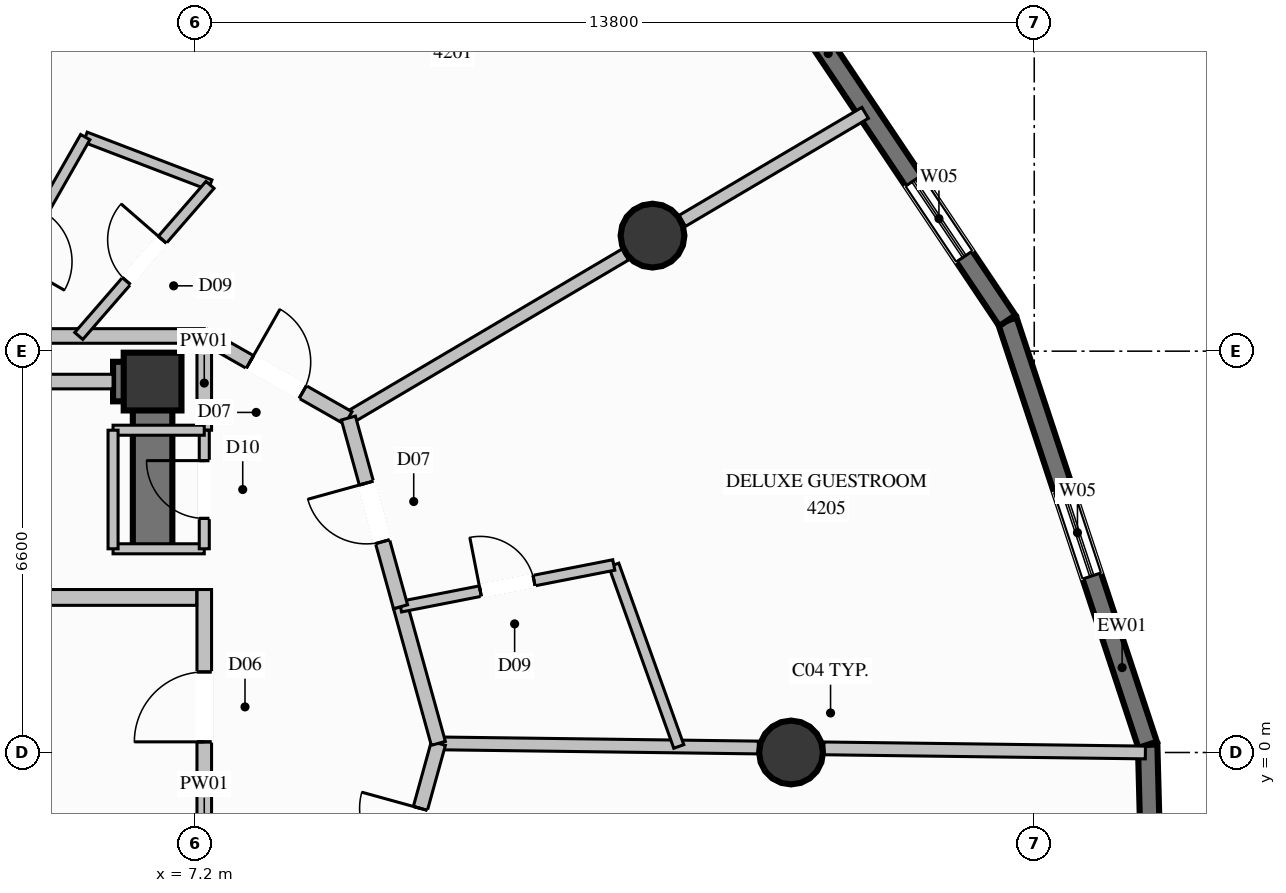
"""IFC4 building model, lengths in metres.
Left out: names, types, materials, properties, quantities, classifications, styles, units other than length and angle.
Written with IfcOpenShell. Run it as: python <this file> out.ifc"""

import sys

from ifc_helpers import new_model, si_unit, direction, frame, frame_2d, origin, origin_2d, place, context, subcontext, project, spatial, rectangle, circle, extrude, element, fill, save


model = new_model("IFC4")
c1 = context("Model", 3, precision=1e-05, world=origin(), true_north=direction((0.0, 1.0)))
c2 = subcontext(c1, "Body", "Model", "MODEL_VIEW")
j1 = project(units=[si_unit("LENGTHUNIT", "METRE"), si_unit("PLANEANGLEUNIT", "RADIAN")], contexts=[c1])
p1 = place(None, origin())
s1 = spatial("IfcSite", under=j1, at=p1, CompositionType="ELEMENT")
p2 = place(p1, origin())
s2 = spatial("IfcBuilding", under=s1, at=p2, CompositionType="ELEMENT")
p3 = place(p2, frame((0.0, 0.0, 156.6)))
s3 = spatial("IfcBuildingStorey", under=s2, at=p3, CompositionType="ELEMENT", Elevation=156.6)
p4 = place(p3, frame((6.5, 6.1, 0.0), z_axis=(0.0, 0.0, 1.0), x_axis=(1.0, 0.0, 0.0)))
e1 = element("IfcColumn", 1, at=p4, inside=s3, PredefinedType="COLUMN", context=c2, shape_type="SweptSolid", body=[
    extrude(rectangle(XDim=0.95, YDim=0.95, at=origin_2d()), origin(), (0.0, 0.0, 1.0), 3.6),
])
p5 = place(p3, frame((5.85, 6.1, 0.0), z_axis=(0.0, 0.0, 1.0), x_axis=(1.0, 0.0, 0.0)))
e2 = element("IfcWall", 2, at=p5, inside=s3, PredefinedType="SHEAR", context=c2, shape_type="SweptSolid", body=[
    extrude(rectangle(XDim=0.325, YDim=0.65, at=frame_2d((0.163, 0.0))), origin(), (0.0, 0.0, 1.0), 3.6),
])
p6 = place(p3, frame((6.5, 3.35, 0.0), z_axis=(0.0, 0.0, 1.0), x_axis=(0.0, 1.0, 0.0)))
e3 = element("IfcWall", 3, at=p6, inside=s3, PredefinedType="SHEAR", context=c2, shape_type="SweptSolid", body=[
    extrude(rectangle(XDim=3.075, YDim=0.65, at=frame_2d((1.538, 0.0))), origin(), (0.0, 0.0, 1.0), 3.6),
])
for number, where, z_axis, x_axis in (
    (4, (17.0, 0.0, 0.0), (0.0, 0.0, 1.0), (1.0, 0.0, 0.0)),
    (5, (14.722, 8.5, 0.0), (0.0, 0.0, 1.0), (1.0, 0.0, 0.0)),
):
    element("IfcColumn", number, at=place(p3, frame(where, z_axis=z_axis, x_axis=x_axis)), inside=s3, PredefinedType="COLUMN", context=c2, shape_type="SweptSolid", body=[
        extrude(circle(Radius=0.525, at=origin_2d()), origin(), (0.0, 0.0, 1.0), 3.6),
    ])
p7 = place(p3, frame((22.865, 0.127, 0.0), z_axis=(0.0, 0.0, 1.0), x_axis=(0.026197372112, -0.999656789951, 0.0)))
e6 = element("IfcWall", 6, at=p7, inside=s3, PredefinedType="SOLIDWALL", context=c2, shape_type="SweptSolid", body=[
    extrude(rectangle(XDim=6.99, YDim=0.32, at=frame_2d((3.495, 0.0))), origin(), (0.0, 0.0, 1.0), 3.35),
])
p8 = place(p7, frame((2.458, 0.0, 0.85)))
e7 = element("IfcOpeningElement", 7, at=p8, cuts=e6, PredefinedType="OPENING", context=c2, shape_type="SweptSolid", body=[
    extrude(rectangle(XDim=1.5, YDim=1.2, at=frame_2d((0.75, 0.6))), frame((0.0, 0.17, 0.0), z_axis=(0.0, -1.0, 0.0), x_axis=(1.0, 0.0, 0.0)), (0.0, 0.0, 1.0), 0.34),
])
p9 = place(p3, frame((20.557, 7.102, 0.0), z_axis=(0.0, 0.0, 1.0), x_axis=(0.314153478082, -0.94937220952, 0.0)))
e8 = element("IfcWall", 8, at=p9, inside=s3, PredefinedType="SOLIDWALL", context=c2, shape_type="SweptSolid", body=[
    extrude(rectangle(XDim=7.347, YDim=0.32, at=frame_2d((3.674, 0.0))), origin(), (0.0, 0.0, 1.0), 3.35),
])
p10 = place(p9, frame((2.923, 0.0, 0.85)))
e9 = element("IfcOpeningElement", 9, at=p10, cuts=e8, PredefinedType="OPENING", context=c2, shape_type="SweptSolid", body=[
    extrude(rectangle(XDim=1.5, YDim=1.2, at=frame_2d((0.75, 0.6))), frame((0.0, 0.17, 0.0), z_axis=(0.0, -1.0, 0.0), x_axis=(1.0, 0.0, 0.0)), (0.0, 0.0, 1.0), 0.34),
])
p11 = place(p3, frame((16.349, 13.381, 0.0), z_axis=(0.0, 0.0, 1.0), x_axis=(0.556688780243, -0.830721133685, 0.0)))
e10 = element("IfcWall", 10, at=p11, inside=s3, PredefinedType="SOLIDWALL", context=c2, shape_type="SweptSolid", body=[
    extrude(rectangle(XDim=7.559, YDim=0.32, at=frame_2d((3.779, 0.0))), origin(), (0.0, 0.0, 1.0), 3.35),
])
p12 = place(p11, frame((4.789, 0.0, 0.85)))
e11 = element("IfcOpeningElement", 11, at=p12, cuts=e10, PredefinedType="OPENING", context=c2, shape_type="SweptSolid", body=[
    extrude(rectangle(XDim=1.5, YDim=1.2, at=frame_2d((0.75, 0.6))), frame((0.0, 0.17, 0.0), z_axis=(0.0, -1.0, 0.0), x_axis=(1.0, 0.0, 0.0)), (0.0, 0.0, 1.0), 0.34),
])
p13 = place(p3, frame((7.35, -2.34, 0.0), z_axis=(0.0, 0.0, 1.0), x_axis=(0.0, 1.0, 0.0)))
e12 = element("IfcWall", 12, at=p13, inside=s3, PredefinedType="PARTITIONING", context=c2, shape_type="SweptSolid", body=[
    extrude(rectangle(XDim=5.02, YDim=0.24, at=frame_2d((2.51, 0.0))), origin(), (0.0, 0.0, 1.0), 2.435),
])
p14 = place(p13, frame((2.515, 0.0, 0.0)))
e13 = element("IfcOpeningElement", 13, at=p14, cuts=e12, PredefinedType="OPENING", context=c2, shape_type="SweptSolid", body=[
    extrude(rectangle(XDim=1.15, YDim=2.2, at=frame_2d((0.575, 1.1))), frame((0.0, 0.13, 0.0), z_axis=(0.0, -1.0, 0.0), x_axis=(1.0, 0.0, 0.0)), (0.0, 0.0, 1.0), 0.26),
])
p15 = place(p3, frame((4.13, 2.55, 0.0), z_axis=(0.0, 0.0, 1.0), x_axis=(1.0, 0.0, 0.0)))
e14 = element("IfcWall", 14, at=p15, inside=s3, PredefinedType="PARTITIONING", context=c2, shape_type="SweptSolid", body=[
    extrude(rectangle(XDim=3.095, YDim=0.26, at=frame_2d((1.548, 0.0))), origin(), (0.0, 0.0, 1.0), 3.35),
])
p16 = place(p3, frame((-7.35, 6.85, 0.0), z_axis=(0.0, 0.0, 1.0), x_axis=(1.0, 0.0, 0.0)))
e15 = element("IfcWall", 15, at=p16, inside=s3, PredefinedType="PARTITIONING", context=c2, shape_type="SweptSolid", body=[
    extrude(rectangle(XDim=14.7, YDim=0.24, at=frame_2d((7.35, 0.0))), origin(), (0.0, 0.0, 1.0), 2.435),
])
p17 = place(p3, frame((7.35, 5.3, 0.0), z_axis=(0.0, 0.0, 1.0), x_axis=(0.0, 1.0, 0.0)))
e16 = element("IfcWall", 16, at=p17, inside=s3, PredefinedType="PARTITIONING", context=c2, shape_type="SweptSolid", body=[
    extrude(rectangle(XDim=1.55, YDim=0.24, at=frame_2d((0.775, 0.0))), origin(), (0.0, 0.0, 1.0), 2.435),
])
p18 = place(p3, frame((3.0, 6.1, 0.0), z_axis=(0.0, 0.0, 1.0), x_axis=(1.0, 0.0, 0.0)))
e17 = element("IfcWall", 17, at=p18, inside=s3, PredefinedType="PARTITIONING", context=c2, shape_type="SweptSolid", body=[
    extrude(rectangle(XDim=2.85, YDim=0.24, at=frame_2d((1.425, 0.0))), origin(), (0.0, 0.0, 1.0), 2.435),
])
p19 = place(p3, frame((5.85, 3.35, 0.0), z_axis=(0.0, 0.0, 1.0), x_axis=(1.0, 0.0, 0.0)))
e18 = element("IfcWall", 18, at=p19, inside=s3, PredefinedType="PARTITIONING", context=c2, shape_type="SweptSolid", body=[
    extrude(rectangle(XDim=1.5, YDim=0.165, at=frame_2d((0.75, 0.0))), origin(), (0.0, 0.0, 1.0), 3.35),
])
p20 = place(p3, frame((7.35, 3.35, 0.0), z_axis=(0.0, 0.0, 1.0), x_axis=(0.0, 1.0, 0.0)))
e19 = element("IfcWall", 19, at=p20, inside=s3, PredefinedType="PARTITIONING", context=c2, shape_type="SweptSolid", body=[
    extrude(rectangle(XDim=1.95, YDim=0.165, at=frame_2d((0.975, 0.0))), origin(), (0.0, 0.0, 1.0), 3.35),
])
p21 = place(p20, frame((0.5, 0.0, 0.0)))
e20 = element("IfcOpeningElement", 20, at=p21, cuts=e19, PredefinedType="OPENING", context=c2, shape_type="SweptSolid", body=[
    extrude(rectangle(XDim=0.95, YDim=2.1, at=frame_2d((0.475, 1.05))), frame((0.0, 0.093, 0.0), z_axis=(0.0, -1.0, 0.0), x_axis=(1.0, 0.0, 0.0)), (0.0, 0.0, 1.0), 0.185),
])
p22 = place(p3, frame((7.35, 5.3, 0.0), z_axis=(0.0, 0.0, 1.0), x_axis=(-1.0, 0.0, 0.0)))
e21 = element("IfcWall", 21, at=p22, inside=s3, PredefinedType="PARTITIONING", context=c2, shape_type="SweptSolid", body=[
    extrude(rectangle(XDim=1.5, YDim=0.165, at=frame_2d((0.75, 0.0))), origin(), (0.0, 0.0, 1.0), 2.435),
])
p23 = place(p3, frame((5.85, 5.3, 0.0), z_axis=(0.0, 0.0, 1.0), x_axis=(0.0, -1.0, 0.0)))
e22 = element("IfcWall", 22, at=p23, inside=s3, PredefinedType="PARTITIONING", context=c2, shape_type="SweptSolid", body=[
    extrude(rectangle(XDim=1.95, YDim=0.165, at=frame_2d((0.975, 0.0))), origin(), (0.0, 0.0, 1.0), 2.435),
])
p24 = place(p3, frame((11.2, 0.15, 0.0), z_axis=(0.0, 0.0, 1.0), x_axis=(0.99991679467, -0.012899757247, 0.0)))
e23 = element("IfcWall", 23, at=p24, inside=s3, PredefinedType="PARTITIONING", context=c2, shape_type="SweptSolid", body=[
    extrude(rectangle(XDim=5.261, YDim=0.21, at=frame_2d((2.631, 0.0))), origin(), (0.0, 0.0, 1.0), 3.35),
])
p25 = place(p3, frame((17.541, 0.068, 0.0), z_axis=(0.0, 0.0, 1.0), x_axis=(0.9999170134, -0.012882791353, 0.0)))
e24 = element("IfcWall", 24, at=p25, inside=s3, PredefinedType="PARTITIONING", context=c2, shape_type="SweptSolid", body=[
    extrude(rectangle(XDim=5.287, YDim=0.21, at=frame_2d((2.644, 0.0))), origin(), (0.0, 0.0, 1.0), 3.35),
])
p26 = place(p3, frame((9.72, 5.5, 0.0), z_axis=(0.0, 0.0, 1.0), x_axis=(0.861092827296, 0.508447777829, 0.0)))
e25 = element("IfcWall", 25, at=p26, inside=s3, PredefinedType="PARTITIONING", context=c2, shape_type="SweptSolid", body=[
    extrude(rectangle(XDim=5.289, YDim=0.21, at=frame_2d((2.644, 0.0))), origin(), (0.0, 0.0, 1.0), 2.717),
])
p27 = place(p3, frame((15.21, 8.742, 0.0), z_axis=(0.0, 0.0, 1.0), x_axis=(0.861047505043, 0.508524526508, 0.0)))
e26 = element("IfcWall", 26, at=p27, inside=s3, PredefinedType="PARTITIONING", context=c2, shape_type="SweptSolid", body=[
    extrude(rectangle(XDim=3.495, YDim=0.21, at=frame_2d((1.747, 0.0))), origin(), (0.0, 0.0, 1.0), 3.35),
])
p28 = place(p3, frame((5.393, 10.12, 0.0), z_axis=(0.0, 0.0, 1.0), x_axis=(0.933965679014, -0.357362715492, 0.0)))
e27 = element("IfcWall", 27, at=p28, inside=s3, PredefinedType="PLUMBINGWALL", context=c2, shape_type="SweptSolid", body=[
    extrude(rectangle(XDim=2.197, YDim=0.175, at=frame_2d((1.099, 0.0))), origin(), (0.0, 0.0, 1.0), 3.35),
])
p29 = place(p3, frame((5.393, 10.12, 0.0), z_axis=(0.0, 0.0, 1.0), x_axis=(-0.495419387998, -0.868653918425, 0.0)))
e28 = element("IfcWall", 28, at=p29, inside=s3, PredefinedType="PLUMBINGWALL", context=c2, shape_type="SweptSolid", body=[
    extrude(rectangle(XDim=3.764, YDim=0.175, at=frame_2d((1.882, 0.0))), origin(), (0.0, 0.0, 1.0), 3.35),
])
p30 = place(p29, frame((1.407, 0.0, 0.0)))
e29 = element("IfcOpeningElement", 29, at=p30, cuts=e28, PredefinedType="OPENING", context=c2, shape_type="SweptSolid", body=[
    extrude(rectangle(XDim=0.95, YDim=2.1, at=frame_2d((0.475, 1.05))), frame((0.0, 0.098, 0.0), z_axis=(0.0, -1.0, 0.0), x_axis=(1.0, 0.0, 0.0)), (0.0, 0.0, 1.0), 0.195),
])
p31 = place(p3, frame((5.286, 6.85, 0.0), z_axis=(0.0, 0.0, 1.0), x_axis=(0.655906923774, 0.754841776365, 0.0)))
e30 = element("IfcWall", 30, at=p31, inside=s3, PredefinedType="PLUMBINGWALL", context=c2, shape_type="SweptSolid", body=[
    extrude(rectangle(XDim=3.292, YDim=0.175, at=frame_2d((1.646, 0.0))), origin(), (0.0, 0.0, 1.0), 2.717),
])
p32 = place(p31, frame((1.196, 0.0, 0.0)))
e31 = element("IfcOpeningElement", 31, at=p32, cuts=e30, PredefinedType="OPENING", context=c2, shape_type="SweptSolid", body=[
    extrude(rectangle(XDim=0.9, YDim=2.1, at=frame_2d((0.45, 1.05))), frame((0.0, 0.098, 0.0), z_axis=(0.0, -1.0, 0.0), x_axis=(1.0, 0.0, 0.0)), (0.0, 0.0, 1.0), 0.195),
])
p33 = place(p3, frame((7.35, 6.85, 0.0), z_axis=(0.0, 0.0, 1.0), x_axis=(0.868892391395, -0.495001022398, 0.0)))
e32 = element("IfcWall", 32, at=p33, inside=s3, PredefinedType="PARTITIONING", context=c2, shape_type="SweptSolid", body=[
    extrude(rectangle(XDim=2.728, YDim=0.24, at=frame_2d((1.364, 0.0))), origin(), (0.0, 0.0, 1.0), 3.35),
])
p34 = place(p33, frame((0.864, 0.0, 0.0)))
e33 = element("IfcOpeningElement", 33, at=p34, cuts=e32, PredefinedType="OPENING", context=c2, shape_type="SweptSolid", body=[
    extrude(rectangle(XDim=1.0, YDim=2.2, at=frame_2d((0.5, 1.1))), frame((0.0, 0.13, 0.0), z_axis=(0.0, -1.0, 0.0), x_axis=(1.0, 0.0, 0.0)), (0.0, 0.0, 1.0), 0.26),
])
p35 = place(p3, frame((10.342, -2.953, 0.0), z_axis=(0.0, 0.0, 1.0), x_axis=(0.266497617314, 0.963835577246, 0.0)))
e34 = element("IfcWall", 34, at=p35, inside=s3, PredefinedType="PARTITIONING", context=c2, shape_type="SweptSolid", body=[
    extrude(rectangle(XDim=3.219, YDim=0.24, at=frame_2d((1.61, 0.0))), origin(), (0.0, 0.0, 1.0), 3.35),
])
p36 = place(p35, frame((1.11, 0.0, 0.0)))
e35 = element("IfcOpeningElement", 35, at=p36, cuts=e34, PredefinedType="OPENING", context=c2, shape_type="SweptSolid", body=[
    extrude(rectangle(XDim=1.0, YDim=2.2, at=frame_2d((0.5, 1.1))), frame((0.0, 0.13, 0.0), z_axis=(0.0, -1.0, 0.0), x_axis=(1.0, 0.0, 0.0)), (0.0, 0.0, 1.0), 0.26),
])
p37 = place(p3, frame((11.2, 0.15, 0.0), z_axis=(0.0, 0.0, 1.0), x_axis=(-0.266801280383, 0.963751563831, 0.0)))
e36 = element("IfcWall", 36, at=p37, inside=s3, PredefinedType="PARTITIONING", context=c2, shape_type="SweptSolid", body=[
    extrude(rectangle(XDim=2.332, YDim=0.24, at=frame_2d((1.166, 0.0))), origin(), (0.0, 0.0, 1.0), 3.35),
])
p38 = place(p3, frame((15.154, 0.099, 0.0), z_axis=(0.0, 0.0, 1.0), x_axis=(-0.337194784979, 0.94143490321, 0.0)))
e37 = element("IfcWall", 37, at=p38, inside=s3, PredefinedType="PLUMBINGWALL", context=c2, shape_type="SweptSolid", body=[
    extrude(rectangle(XDim=3.171, YDim=0.175, at=frame_2d((1.585, 0.0))), origin(), (0.0, 0.0, 1.0), 3.35),
])
p39 = place(p3, frame((10.578, 2.397, 0.0), z_axis=(0.0, 0.0, 1.0), x_axis=(0.981348131886, 0.192239028411, 0.0)))
e38 = element("IfcWall", 38, at=p39, inside=s3, PredefinedType="PLUMBINGWALL", context=c2, shape_type="SweptSolid", body=[
    extrude(rectangle(XDim=3.574, YDim=0.175, at=frame_2d((1.787, 0.0))), origin(), (0.0, 0.0, 1.0), 3.35),
])
p40 = place(p39, frame((1.337, 0.0, 0.0)))
e39 = element("IfcOpeningElement", 39, at=p40, cuts=e38, PredefinedType="OPENING", context=c2, shape_type="SweptSolid", body=[
    extrude(rectangle(XDim=0.9, YDim=2.1, at=frame_2d((0.45, 1.05))), frame((0.0, 0.098, 0.0), z_axis=(0.0, -1.0, 0.0), x_axis=(1.0, 0.0, 0.0)), (0.0, 0.0, 1.0), 0.195),
])
p41 = place(p3, frame((10.578, 2.397, 0.0), z_axis=(0.0, 0.0, 1.0), x_axis=(-0.266478138733, 0.963840962803, 0.0)))
e40 = element("IfcWall", 40, at=p41, inside=s3, PredefinedType="PARTITIONING", context=c2, shape_type="SweptSolid", body=[
    extrude(rectangle(XDim=3.219, YDim=0.24, at=frame_2d((1.61, 0.0))), origin(), (0.0, 0.0, 1.0), 3.35),
])
p42 = place(p41, frame((1.11, 0.0, 0.0)))
e41 = element("IfcOpeningElement", 41, at=p42, cuts=e40, PredefinedType="OPENING", context=c2, shape_type="SweptSolid", body=[
    extrude(rectangle(XDim=1.0, YDim=2.2, at=frame_2d((0.5, 1.1))), frame((0.0, 0.13, 0.0), z_axis=(0.0, -1.0, 0.0), x_axis=(1.0, 0.0, 0.0)), (0.0, 0.0, 1.0), 0.26),
])
p43 = place(p10, origin())
e42 = element("IfcWindow", 42, at=p43, inside=s3, PartitioningType="SINGLE_PANEL", PredefinedType="WINDOW", context=c2, shape_type="SweptSolid", body=[
    extrude(rectangle(XDim=1.5, YDim=1.2, at=frame_2d((0.75, 0.6))), frame((0.0, 0.03, 0.0), z_axis=(0.0, -1.0, 0.0), x_axis=(1.0, 0.0, 0.0)), (0.0, 0.0, 1.0), 0.06),
])
fill(e9, e42)
p44 = place(p12, origin())
e43 = element("IfcWindow", 43, at=p44, inside=s3, PartitioningType="SINGLE_PANEL", PredefinedType="WINDOW", context=c2, shape_type="SweptSolid", body=[
    extrude(rectangle(XDim=1.5, YDim=1.2, at=frame_2d((0.75, 0.6))), frame((0.0, 0.03, 0.0), z_axis=(0.0, -1.0, 0.0), x_axis=(1.0, 0.0, 0.0)), (0.0, 0.0, 1.0), 0.06),
])
fill(e11, e43)
p45 = place(p14, origin())
e44 = element("IfcDoor", 44, at=p45, inside=s3, OperationType="SINGLE_SWING_LEFT", PredefinedType="DOOR", context=c2, shape_type="SweptSolid", body=[
    extrude(rectangle(XDim=1.15, YDim=2.2, at=frame_2d((0.575, 1.1))), frame((0.0, 0.025, 0.0), z_axis=(0.0, -1.0, 0.0), x_axis=(1.0, 0.0, 0.0)), (0.0, 0.0, 1.0), 0.05),
])
fill(e13, e44)
p46 = place(p21, origin())
e45 = element("IfcDoor", 45, at=p46, inside=s3, OperationType="SINGLE_SWING_RIGHT", PredefinedType="DOOR", context=c2, shape_type="SweptSolid", body=[
    extrude(rectangle(XDim=0.95, YDim=2.1, at=frame_2d((0.475, 1.05))), frame((0.0, 0.025, 0.0), z_axis=(0.0, -1.0, 0.0), x_axis=(1.0, 0.0, 0.0)), (0.0, 0.0, 1.0), 0.05),
])
fill(e20, e45)
p47 = place(p32, origin())
e46 = element("IfcDoor", 46, at=p47, inside=s3, OperationType="SINGLE_SWING_RIGHT", PredefinedType="DOOR", context=c2, shape_type="SweptSolid", body=[
    extrude(rectangle(XDim=0.9, YDim=2.1, at=frame_2d((0.45, 1.05))), frame((0.0, 0.025, 0.0), z_axis=(0.0, -1.0, 0.0), x_axis=(1.0, 0.0, 0.0)), (0.0, 0.0, 1.0), 0.05),
])
fill(e31, e46)
p48 = place(p34, origin())
e47 = element("IfcDoor", 47, at=p48, inside=s3, OperationType="SINGLE_SWING_LEFT", PredefinedType="DOOR", context=c2, shape_type="SweptSolid", body=[
    extrude(rectangle(XDim=1.0, YDim=2.2, at=frame_2d((0.5, 1.1))), frame((0.0, 0.025, 0.0), z_axis=(0.0, -1.0, 0.0), x_axis=(1.0, 0.0, 0.0)), (0.0, 0.0, 1.0), 0.05),
])
fill(e33, e47)
p49 = place(p36, origin())
e48 = element("IfcDoor", 48, at=p49, inside=s3, OperationType="SINGLE_SWING_RIGHT", PredefinedType="DOOR", context=c2, shape_type="SweptSolid", body=[
    extrude(rectangle(XDim=1.0, YDim=2.2, at=frame_2d((0.5, 1.1))), frame((0.0, 0.025, 0.0), z_axis=(0.0, -1.0, 0.0), x_axis=(1.0, 0.0, 0.0)), (0.0, 0.0, 1.0), 0.05),
])
fill(e35, e48)
p50 = place(p40, origin())
e49 = element("IfcDoor", 49, at=p50, inside=s3, OperationType="SINGLE_SWING_LEFT", PredefinedType="DOOR", context=c2, shape_type="SweptSolid", body=[
    extrude(rectangle(XDim=0.9, YDim=2.1, at=frame_2d((0.45, 1.05))), frame((0.0, 0.025, 0.0), z_axis=(0.0, -1.0, 0.0), x_axis=(1.0, 0.0, 0.0)), (0.0, 0.0, 1.0), 0.05),
])
fill(e39, e49)
p51 = place(p42, origin())
e50 = element("IfcDoor", 50, at=p51, inside=s3, OperationType="SINGLE_SWING_RIGHT", PredefinedType="DOOR", context=c2, shape_type="SweptSolid", body=[
    extrude(rectangle(XDim=1.0, YDim=2.2, at=frame_2d((0.5, 1.1))), frame((0.0, 0.025, 0.0), z_axis=(0.0, -1.0, 0.0), x_axis=(1.0, 0.0, 0.0)), (0.0, 0.0, 1.0), 0.05),
])
fill(e41, e50)
save(model, sys.argv[1])
